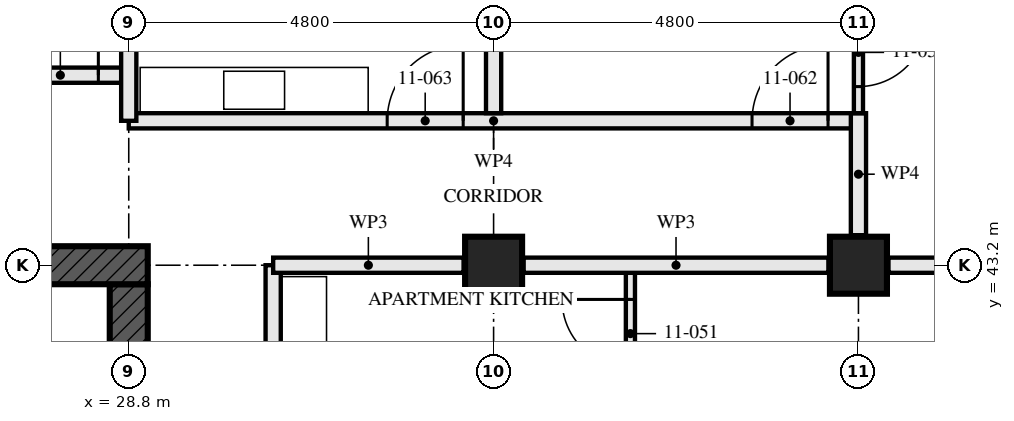
"""IFC4 building model, lengths in metres.
Left out: names, types, materials, properties, quantities, classifications, styles, units other than length and angle.
Written with IfcOpenShell. Run it as: python <this file> out.ifc"""

import sys

from ifc_helpers import new_model, si_unit, direction, frame, frame_2d, origin, origin_2d, place, context, subcontext, project, spatial, rectangle, hollow_rectangle, extrude, element, fill, save


model = new_model("IFC4")
c1 = context("Model", 3, precision=1e-05, world=origin(), true_north=direction((0.0, 1.0)))
c2 = subcontext(c1, "Body", "Model", "MODEL_VIEW")
j1 = project(units=[si_unit("LENGTHUNIT", "METRE"), si_unit("PLANEANGLEUNIT", "RADIAN")], contexts=[c1])
p1 = place(None, origin())
s1 = spatial("IfcSite", under=j1, at=p1, CompositionType="ELEMENT")
p2 = place(p1, origin())
s2 = spatial("IfcBuilding", under=s1, at=p2, CompositionType="ELEMENT")
p3 = place(p2, frame((0.0, 0.0, 44.5)))
s3 = spatial("IfcBuildingStorey", under=s2, at=p3, CompositionType="ELEMENT", Elevation=44.5)
for number, where, z_axis, x_axis in (
    (1, (33.6, 43.2, 0.0), (0.0, 0.0, 1.0), (0.0, 1.0, 0.0)),
    (2, (38.4, 43.2, 0.0), (0.0, 0.0, 1.0), (0.0, 1.0, 0.0)),
):
    element("IfcColumn", number, at=place(p3, frame(where, z_axis=z_axis, x_axis=x_axis)), inside=s3, PredefinedType="COLUMN", context=c2, shape_type="SweptSolid", body=[
        extrude(hollow_rectangle(XDim=0.75, YDim=0.75, WallThickness=0.08, at=origin_2d()), origin(), (0.0, 0.0, 1.0), 3.5),
    ])
p4 = place(p3, frame((29.05, 43.2, -0.17), z_axis=(0.0, 0.0, 1.0), x_axis=(-1.0, 0.0, 0.0)))
e3 = element("IfcWall", 3, at=p4, inside=s3, PredefinedType="SHEAR", context=c2, shape_type="SweptSolid", body=[
    extrude(rectangle(XDim=14.9, YDim=0.5, at=frame_2d((7.45, 0.0))), origin(), (0.0, 0.0, 1.0), 3.5),
])
p5 = place(p4, frame((6.85, 0.0, 0.17)))
e4 = element("IfcOpeningElement", 4, at=p5, cuts=e3, PredefinedType="OPENING", context=c2, shape_type="SweptSolid", body=[
    extrude(rectangle(XDim=1.2, YDim=2.1, at=frame_2d((0.6, 1.05))), frame((0.0, 0.26, 0.0), z_axis=(0.0, -1.0, 0.0), x_axis=(1.0, 0.0, 0.0)), (0.0, 0.0, 1.0), 0.521),
])
p6 = place(p3, frame((28.8, 29.05, -0.17), z_axis=(0.0, 0.0, 1.0), x_axis=(0.0, 1.0, 0.0)))
e5 = element("IfcWall", 5, at=p6, inside=s3, PredefinedType="SHEAR", context=c2, shape_type="SweptSolid", body=[
    extrude(rectangle(XDim=13.9, YDim=0.5, at=frame_2d((6.95, 0.0))), origin(), (0.0, 0.0, 1.0), 3.5),
])
p7 = place(p6, frame((6.35, 0.0, 0.17)))
e6 = element("IfcOpeningElement", 6, at=p7, cuts=e5, PredefinedType="OPENING", context=c2, shape_type="SweptSolid", body=[
    extrude(rectangle(XDim=1.2, YDim=2.1, at=frame_2d((0.6, 1.05))), frame((0.0, 0.26, 0.0), z_axis=(0.0, -1.0, 0.0), x_axis=(1.0, 0.0, 0.0)), (0.0, 0.0, 1.0), 0.521),
])
p8 = place(p3, frame((28.8, 45.7, 0.0), z_axis=(0.0, 0.0, 1.0), x_axis=(-1.0, 0.0, 0.0)))
e7 = element("IfcWall", 7, at=p8, inside=s3, PredefinedType="PARTITIONING", context=c2, shape_type="SweptSolid", body=[
    extrude(rectangle(XDim=14.4, YDim=0.2, at=frame_2d((7.2, 0.0))), origin(), (0.0, 0.0, 1.0), 3.33),
])
p9 = place(p8, frame((0.4, 0.0, 0.0)))
e8 = element("IfcOpeningElement", 8, at=p9, cuts=e7, PredefinedType="OPENING", context=c2, shape_type="SweptSolid", body=[
    extrude(rectangle(XDim=1.0, YDim=2.1, at=frame_2d((0.5, 1.05))), frame((0.0, 0.111, 0.0), z_axis=(0.0, -1.0, 0.0), x_axis=(1.0, 0.0, 0.0)), (0.0, 0.0, 1.0), 0.221),
])
p10 = place(p3, frame((35.4, 38.4, 0.0), z_axis=(0.0, 0.0, 1.0), x_axis=(0.0, 1.0, 0.0)))
e9 = element("IfcWall", 9, at=p10, inside=s3, PredefinedType="PARTITIONING", context=c2, shape_type="SweptSolid", body=[
    extrude(rectangle(XDim=4.8, YDim=0.12, at=frame_2d((2.4, 0.0))), origin(), (0.0, 0.0, 1.0), 3.33),
])
p11 = place(p10, frame((3.45, 0.0, 0.0)))
e10 = element("IfcOpeningElement", 10, at=p11, cuts=e9, PredefinedType="OPENING", context=c2, shape_type="SweptSolid", body=[
    extrude(rectangle(XDim=0.9, YDim=2.1, at=frame_2d((0.45, 1.05))), frame((0.0, 0.071, 0.0), z_axis=(0.0, -1.0, 0.0), x_axis=(1.0, 0.0, 0.0)), (0.0, 0.0, 1.0), 0.141),
])
p12 = place(p3, frame((30.7, 28.8, 0.0), z_axis=(0.0, 0.0, 1.0), x_axis=(0.0, 1.0, 0.0)))
e11 = element("IfcWall", 11, at=p12, inside=s3, PredefinedType="PARTITIONING", context=c2, shape_type="SweptSolid", body=[
    extrude(rectangle(XDim=14.4, YDim=0.2, at=frame_2d((7.2, 0.0))), origin(), (0.0, 0.0, 1.0), 2.55),
])
p13 = place(p12, frame((1.4, 0.0, 0.0)))
e12 = element("IfcOpeningElement", 12, at=p13, cuts=e11, PredefinedType="OPENING", context=c2, shape_type="SweptSolid", body=[
    extrude(rectangle(XDim=1.0, YDim=2.1, at=frame_2d((0.5, 1.05))), frame((0.0, 0.111, 0.0), z_axis=(0.0, -1.0, 0.0), x_axis=(1.0, 0.0, 0.0)), (0.0, 0.0, 1.0), 0.221),
])
p14 = place(p12, frame((4.1, 0.0, 0.0)))
e13 = element("IfcOpeningElement", 13, at=p14, cuts=e11, PredefinedType="OPENING", context=c2, shape_type="SweptSolid", body=[
    extrude(rectangle(XDim=1.0, YDim=2.1, at=frame_2d((0.5, 1.05))), frame((0.0, 0.111, 0.0), z_axis=(0.0, -1.0, 0.0), x_axis=(1.0, 0.0, 0.0)), (0.0, 0.0, 1.0), 0.221),
])
p15 = place(p12, frame((5.975, 0.0, 0.0)))
e14 = element("IfcOpeningElement", 14, at=p15, cuts=e11, PredefinedType="OPENING", context=c2, shape_type="SweptSolid", body=[
    extrude(rectangle(XDim=1.0, YDim=2.1, at=frame_2d((0.5, 1.05))), frame((0.0, 0.111, 0.0), z_axis=(0.0, -1.0, 0.0), x_axis=(1.0, 0.0, 0.0)), (0.0, 0.0, 1.0), 0.221),
])
p16 = place(p12, frame((10.0, 0.0, 0.0)))
e15 = element("IfcOpeningElement", 15, at=p16, cuts=e11, PredefinedType="OPENING", context=c2, shape_type="SweptSolid", body=[
    extrude(rectangle(XDim=1.0, YDim=2.1, at=frame_2d((0.5, 1.05))), frame((0.0, 0.111, 0.0), z_axis=(0.0, -1.0, 0.0), x_axis=(1.0, 0.0, 0.0)), (0.0, 0.0, 1.0), 0.221),
])
p17 = place(p3, frame((38.4, 48.2, 0.0), z_axis=(0.0, 0.0, 1.0), x_axis=(0.0, -1.0, 0.0)))
e16 = element("IfcWall", 16, at=p17, inside=s3, PredefinedType="PARTITIONING", context=c2, shape_type="SweptSolid", body=[
    extrude(rectangle(XDim=3.0, YDim=0.12, at=frame_2d((1.5, 0.0))), origin(), (0.0, 0.0, 1.0), 2.55),
])
p18 = place(p17, frame((1.75, 0.0, 0.0)))
e17 = element("IfcOpeningElement", 17, at=p18, cuts=e16, PredefinedType="OPENING", context=c2, shape_type="SweptSolid", body=[
    extrude(rectangle(XDim=0.9, YDim=2.1, at=frame_2d((0.45, 1.05))), frame((0.0, 0.071, 0.0), z_axis=(0.0, -1.0, 0.0), x_axis=(1.0, 0.0, 0.0)), (0.0, 0.0, 1.0), 0.141),
])
p19 = place(p3, frame((33.6, 57.353, 0.0), z_axis=(0.0, 0.0, 1.0), x_axis=(0.0, -1.0, 0.0)))
e18 = element("IfcWall", 18, at=p19, inside=s3, PredefinedType="PARTITIONING", context=c2, shape_type="SweptSolid", body=[
    extrude(rectangle(XDim=12.153, YDim=0.2, at=frame_2d((6.077, 0.0))), origin(), (0.0, 0.0, 1.0), 2.55),
])
p20 = place(p3, frame((38.4, 45.1, 0.0), z_axis=(0.0, 0.0, 1.0), x_axis=(-1.0, 0.0, 0.0)))
e19 = element("IfcWall", 19, at=p20, inside=s3, PredefinedType="PARTITIONING", context=c2, shape_type="SweptSolid", body=[
    extrude(rectangle(XDim=9.6, YDim=0.2, at=frame_2d((4.8, 0.0))), origin(), (0.0, 0.0, 1.0), 3.33),
])
p21 = place(p20, frame((0.4, 0.0, 0.0)))
e20 = element("IfcOpeningElement", 20, at=p21, cuts=e19, PredefinedType="OPENING", context=c2, shape_type="SweptSolid", body=[
    extrude(rectangle(XDim=1.0, YDim=2.1, at=frame_2d((0.5, 1.05))), frame((0.0, 0.111, 0.0), z_axis=(0.0, -1.0, 0.0), x_axis=(1.0, 0.0, 0.0)), (0.0, 0.0, 1.0), 0.221),
])
p22 = place(p20, frame((5.2, 0.0, 0.0)))
e21 = element("IfcOpeningElement", 21, at=p22, cuts=e19, PredefinedType="OPENING", context=c2, shape_type="SweptSolid", body=[
    extrude(rectangle(XDim=1.0, YDim=2.1, at=frame_2d((0.5, 1.05))), frame((0.0, 0.111, 0.0), z_axis=(0.0, -1.0, 0.0), x_axis=(1.0, 0.0, 0.0)), (0.0, 0.0, 1.0), 0.221),
])
p23 = place(p3, frame((38.4, 45.2, 0.0), z_axis=(0.0, 0.0, 1.0), x_axis=(0.0, -1.0, 0.0)))
e22 = element("IfcWall", 22, at=p23, inside=s3, PredefinedType="PARTITIONING", context=c2, shape_type="SweptSolid", body=[
    extrude(rectangle(XDim=1.605, YDim=0.2, at=frame_2d((0.802, 0.0))), origin(), (0.0, 0.0, 1.0), 3.33),
])
p24 = place(p3, frame((28.8, 45.1, 0.0), z_axis=(0.0, 0.0, 1.0), x_axis=(0.0, 1.0, 0.0)))
e23 = element("IfcWall", 23, at=p24, inside=s3, PredefinedType="PARTITIONING", context=c2, shape_type="SweptSolid", body=[
    extrude(rectangle(XDim=2.555, YDim=0.2, at=frame_2d((1.277, 0.0))), origin(), (0.0, 0.0, 1.0), 2.32),
])
p25 = place(p3, frame((42.896, 43.2, 0.0), z_axis=(0.0, 0.0, 1.0), x_axis=(-1.0, 0.0, 0.0)))
e24 = element("IfcWall", 24, at=p25, inside=s3, PredefinedType="PARTITIONING", context=c2, shape_type="SweptSolid", body=[
    extrude(rectangle(XDim=4.101, YDim=0.2, at=frame_2d((2.05, 0.0))), origin(), (0.0, 0.0, 1.0), 2.32),
])
p26 = place(p3, frame((38.005, 43.2, 0.0), z_axis=(0.0, 0.0, 1.0), x_axis=(-1.0, 0.0, 0.0)))
e25 = element("IfcWall", 25, at=p26, inside=s3, PredefinedType="PARTITIONING", context=c2, shape_type="SweptSolid", body=[
    extrude(rectangle(XDim=4.01, YDim=0.2, at=frame_2d((2.005, 0.0))), origin(), (0.0, 0.0, 1.0), 2.32),
])
p27 = place(p3, frame((33.205, 43.2, 0.0), z_axis=(0.0, 0.0, 1.0), x_axis=(-1.0, 0.0, 0.0)))
e26 = element("IfcWall", 26, at=p27, inside=s3, PredefinedType="PARTITIONING", context=c2, shape_type="SweptSolid", body=[
    extrude(rectangle(XDim=2.505, YDim=0.2, at=frame_2d((1.252, 0.0))), origin(), (0.0, 0.0, 1.0), 2.32),
])
p28 = place(p9, frame((1.0, 0.0, 0.0), z_axis=(0.0, 0.0, 1.0), x_axis=(-1.0, 0.0, 0.0)))
e27 = element("IfcDoor", 27, at=p28, inside=s3, OperationType="SINGLE_SWING_LEFT", PredefinedType="DOOR", context=c2, shape_type="SweptSolid", body=[
    extrude(rectangle(XDim=1.0, YDim=2.1, at=frame_2d((0.5, 1.05))), frame((0.0, 0.027, 0.0), z_axis=(0.0, -1.0, 0.0), x_axis=(1.0, 0.0, 0.0)), (0.0, 0.0, 1.0), 0.054),
])
fill(e8, e27)
p29 = place(p11, origin())
e28 = element("IfcDoor", 28, at=p29, inside=s3, OperationType="SINGLE_SWING_LEFT", PredefinedType="DOOR", context=c2, shape_type="SweptSolid", body=[
    extrude(rectangle(XDim=0.9, YDim=2.1, at=frame_2d((0.45, 1.05))), frame((0.0, 0.022, 0.0), z_axis=(0.0, -1.0, 0.0), x_axis=(1.0, 0.0, 0.0)), (0.0, 0.0, 1.0), 0.044),
])
fill(e10, e28)
p30 = place(p18, origin())
e29 = element("IfcDoor", 29, at=p30, inside=s3, OperationType="SINGLE_SWING_RIGHT", PredefinedType="DOOR", context=c2, shape_type="SweptSolid", body=[
    extrude(rectangle(XDim=0.9, YDim=2.1, at=frame_2d((0.45, 1.05))), frame((0.0, 0.022, 0.0), z_axis=(0.0, -1.0, 0.0), x_axis=(1.0, 0.0, 0.0)), (0.0, 0.0, 1.0), 0.044),
])
fill(e17, e29)
p31 = place(p21, frame((1.0, 0.0, 0.0), z_axis=(0.0, 0.0, 1.0), x_axis=(-1.0, 0.0, 0.0)))
e30 = element("IfcDoor", 30, at=p31, inside=s3, OperationType="SINGLE_SWING_LEFT", PredefinedType="DOOR", context=c2, shape_type="SweptSolid", body=[
    extrude(rectangle(XDim=1.0, YDim=2.1, at=frame_2d((0.5, 1.05))), frame((0.0, 0.027, 0.0), z_axis=(0.0, -1.0, 0.0), x_axis=(1.0, 0.0, 0.0)), (0.0, 0.0, 1.0), 0.054),
])
fill(e20, e30)
p32 = place(p22, frame((1.0, 0.0, 0.0), z_axis=(0.0, 0.0, 1.0), x_axis=(-1.0, 0.0, 0.0)))
e31 = element("IfcDoor", 31, at=p32, inside=s3, OperationType="SINGLE_SWING_LEFT", PredefinedType="DOOR", context=c2, shape_type="SweptSolid", body=[
    extrude(rectangle(XDim=1.0, YDim=2.1, at=frame_2d((0.5, 1.05))), frame((0.0, 0.027, 0.0), z_axis=(0.0, -1.0, 0.0), x_axis=(1.0, 0.0, 0.0)), (0.0, 0.0, 1.0), 0.054),
])
fill(e21, e31)
save(model, sys.argv[1])
